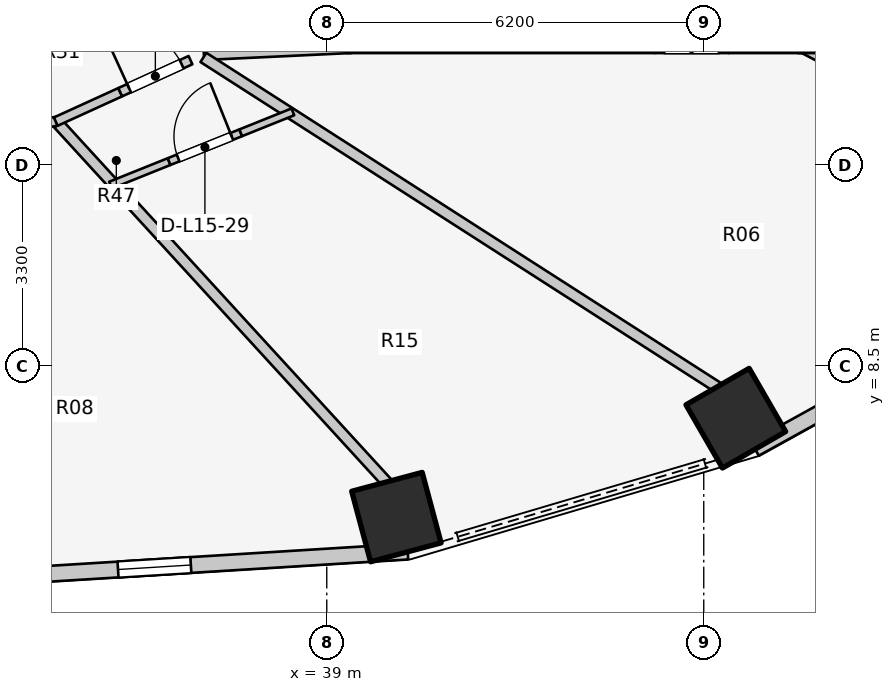
"""IFC4 building model, lengths in metres.
Left out: names, types, materials, properties, quantities, classifications, styles, units other than length and angle.
Written with IfcOpenShell. Run it as: python <this file> out.ifc"""

import sys

from ifc_helpers import new_model, si_unit, direction, frame, frame_2d, origin, origin_2d, place, context, subcontext, project, spatial, rectangle, extrude, element, fill, save


model = new_model("IFC4")
c1 = context("Model", 3, precision=1e-05, world=origin(), true_north=direction((0.0, 1.0)))
c2 = subcontext(c1, "Body", "Model", "MODEL_VIEW")
j1 = project(units=[si_unit("LENGTHUNIT", "METRE"), si_unit("PLANEANGLEUNIT", "RADIAN")], contexts=[c1])
p1 = place(None, origin())
s1 = spatial("IfcSite", under=j1, at=p1, CompositionType="ELEMENT")
p2 = place(p1, origin())
s2 = spatial("IfcBuilding", under=s1, at=p2, CompositionType="ELEMENT")
p3 = place(p2, frame((0.0, 0.0, 52.4)))
s3 = spatial("IfcBuildingStorey", under=s2, at=p3, CompositionType="ELEMENT", Elevation=52.4)
for number, where, z_axis, x_axis in (
    (1, (40.145, 6.014, 0.0), (0.0, 0.0, 1.0), (0.259, -0.966, 0.0)),
    (2, (45.727, 7.641, 0.0), (0.0, 0.0, 1.0), (0.5, -0.866, 0.0)),
):
    element("IfcColumn", number, at=place(p3, frame(where, z_axis=z_axis, x_axis=x_axis)), inside=s3, PredefinedType="COLUMN", context=c2, shape_type="SweptSolid", body=[
        extrude(rectangle(XDim=1.2, YDim=1.2, at=origin_2d()), origin(), (0.0, 0.0, 1.0), 3.1),
    ])
p4 = place(p3, frame((32.0, 4.931, 0.0), z_axis=(0.0, 0.0, 1.0), x_axis=(0.998090514779, 0.061768311519, 0.0)))
e3 = element("IfcWall", 3, at=p4, inside=s3, PredefinedType="STANDARD", context=c2, shape_type="SweptSolid", body=[
    extrude(rectangle(XDim=8.348, YDim=0.26, at=frame_2d((4.174, 0.0))), origin(), (0.0, 0.0, 1.0), 1.22),
])
p5 = place(p4, frame((3.574, 0.0, 0.15)))
e4 = element("IfcOpeningElement", 4, at=p5, cuts=e3, PredefinedType="OPENING", context=c2, shape_type="SweptSolid", body=[
    extrude(rectangle(XDim=1.2, YDim=0.9, at=frame_2d((0.6, 0.45))), frame((0.0, 0.14, 0.0), z_axis=(0.0, -1.0, 0.0), x_axis=(1.0, 0.0, 0.0)), (0.0, 0.0, 1.0), 0.28),
])
p6 = place(p3, frame((46.042, 7.138, 0.0), z_axis=(0.0, 0.0, 1.0), x_axis=(0.875137303239, 0.483874674352, 0.0)))
e5 = element("IfcWall", 5, at=p6, inside=s3, PredefinedType="STANDARD", context=c2, shape_type="SweptSolid", body=[
    extrude(rectangle(XDim=4.985, YDim=0.26, at=frame_2d((2.493, 0.0))), origin(), (0.0, 0.0, 1.0), 1.22),
])
p7 = place(p3, frame((46.756, 13.743, 0.0), z_axis=(0.0, 0.0, 1.0), x_axis=(0.885552742751, -0.464538846391, 0.0)))
e6 = element("IfcWall", 6, at=p7, inside=s3, PredefinedType="MOVABLE", context=c2, shape_type="SweptSolid", body=[
    extrude(rectangle(XDim=1.492, YDim=0.12, at=frame_2d((0.746, 0.0))), origin(), (0.0, 0.0, 1.0), 2.575),
])
p8 = place(p3, frame((36.98, 13.606, 0.0), z_axis=(0.0, 0.0, 1.0), x_axis=(0.998877427952, 0.047369651964, 0.0)))
e7 = element("IfcWall", 7, at=p8, inside=s3, PredefinedType="PARTITIONING", context=c2, shape_type="SweptSolid", body=[
    extrude(rectangle(XDim=2.433, YDim=0.15, at=frame_2d((1.216, 0.0))), origin(), (0.0, 0.0, 1.0), 1.22),
])
p9 = place(p3, frame((39.33, 13.72, 0.0), z_axis=(0.0, 0.0, 1.0), x_axis=(1.0, 0.0, 0.0)))
e8 = element("IfcWall", 8, at=p9, inside=s3, PredefinedType="PARTITIONING", context=c2, shape_type="SweptSolid", body=[
    extrude(rectangle(XDim=5.06, YDim=0.15, at=frame_2d((2.53, 0.0))), origin(), (0.0, 0.0, 1.0), 1.22),
])
p10 = place(p3, frame((44.39, 13.72, 0.0), z_axis=(0.0, 0.0, 1.0), x_axis=(1.0, 0.0, 0.0)))
e9 = element("IfcWall", 9, at=p10, inside=s3, PredefinedType="PARTITIONING", context=c2, shape_type="SweptSolid", body=[
    extrude(rectangle(XDim=1.22, YDim=0.15, at=frame_2d((0.61, 0.0))), origin(), (0.0, 0.0, 1.0), 2.575),
])
p11 = place(p10, frame((0.16, 0.0, 0.0)))
e10 = element("IfcOpeningElement", 10, at=p11, cuts=e9, PredefinedType="OPENING", context=c2, shape_type="SweptSolid", body=[
    extrude(rectangle(XDim=0.9, YDim=2.1, at=frame_2d((0.45, 1.05))), frame((0.0, 0.085, 0.0), z_axis=(0.0, -1.0, 0.0), x_axis=(1.0, 0.0, 0.0)), (0.0, 0.0, 1.0), 0.17),
])
p12 = place(p3, frame((45.61, 13.72, 0.0), z_axis=(0.0, 0.0, 1.0), x_axis=(1.0, 0.0, 0.0)))
e11 = element("IfcWall", 11, at=p12, inside=s3, PredefinedType="PARTITIONING", context=c2, shape_type="SweptSolid", body=[
    extrude(rectangle(XDim=1.24, YDim=0.15, at=frame_2d((0.62, 0.0))), origin(), (0.0, 0.0, 1.0), 2.575),
])
p13 = place(p3, frame((46.75, 13.72, 0.0), z_axis=(0.0, 0.0, 1.0), x_axis=(1.0, 0.0, 0.0)))
e12 = element("IfcWall", 12, at=p13, inside=s3, PredefinedType="PARTITIONING", context=c2, shape_type="SweptSolid", body=[
    extrude(rectangle(XDim=5.05, YDim=0.15, at=frame_2d((2.525, 0.0))), origin(), (0.0, 0.0, 1.0), 1.22),
])
p14 = place(p3, frame((34.586, 12.479, 0.0), z_axis=(0.0, 0.0, 1.0), x_axis=(0.675465011224, -0.737392038615, 0.0)))
e13 = element("IfcWall", 13, at=p14, inside=s3, PredefinedType="PARTITIONING", context=c2, shape_type="SweptSolid", body=[
    extrude(rectangle(XDim=8.007, YDim=0.18, at=frame_2d((4.003, 0.0))), origin(), (0.0, 0.0, 1.0), 1.22),
])
p15 = place(p3, frame((36.971, 13.574, 0.0), z_axis=(0.0, 0.0, 1.0), x_axis=(0.841689919529, -0.5399611832, 0.0)))
e14 = element("IfcWall", 14, at=p15, inside=s3, PredefinedType="PARTITIONING", context=c2, shape_type="SweptSolid", body=[
    extrude(rectangle(XDim=10.058, YDim=0.18, at=frame_2d((5.029, 0.0))), origin(), (0.0, 0.0, 1.0), 1.22),
])
p16 = place(p3, frame((33.903, 12.427, 0.0), z_axis=(0.0, 0.0, 1.0), x_axis=(0.989636221287, 0.143597177958, 0.0)))
e15 = element("IfcWall", 15, at=p16, inside=s3, PredefinedType="PARTITIONING", context=c2, shape_type="SweptSolid", body=[
    extrude(rectangle(XDim=0.66, YDim=0.15, at=frame_2d((0.33, 0.0))), origin(), (0.0, 0.0, 1.0), 2.575),
])
p17 = place(p3, frame((35.444, 11.474, 0.0), z_axis=(0.0, 0.0, 1.0), x_axis=(0.927842429586, 0.372972419704, 0.0)))
e16 = element("IfcWall", 16, at=p17, inside=s3, PredefinedType="MOVABLE", context=c2, shape_type="SweptSolid", body=[
    extrude(rectangle(XDim=1.038, YDim=0.12, at=frame_2d((0.519, 0.0))), origin(), (0.0, 0.0, 1.0), 1.22),
])
p18 = place(p3, frame((36.407, 11.861, 0.0), z_axis=(0.0, 0.0, 1.0), x_axis=(0.927932127314, 0.372749201339, 0.0)))
e17 = element("IfcWall", 17, at=p18, inside=s3, PredefinedType="MOVABLE", context=c2, shape_type="SweptSolid", body=[
    extrude(rectangle(XDim=1.27, YDim=0.12, at=frame_2d((0.635, 0.0))), origin(), (0.0, 0.0, 1.0), 2.16),
])
p19 = place(p18, frame((0.16, 0.0, 0.0)))
e18 = element("IfcOpeningElement", 18, at=p19, cuts=e17, PredefinedType="OPENING", context=c2, shape_type="SweptSolid", body=[
    extrude(rectangle(XDim=0.95, YDim=2.1, at=frame_2d((0.475, 1.05))), frame((0.0, 0.07, 0.0), z_axis=(0.0, -1.0, 0.0), x_axis=(1.0, 0.0, 0.0)), (0.0, 0.0, 1.0), 0.14),
])
p20 = place(p3, frame((37.585, 12.334, 0.0), z_axis=(0.0, 0.0, 1.0), x_axis=(0.927874016973, 0.372893830233, 0.0)))
e19 = element("IfcWall", 19, at=p20, inside=s3, PredefinedType="MOVABLE", context=c2, shape_type="SweptSolid", body=[
    extrude(rectangle(XDim=0.924, YDim=0.12, at=frame_2d((0.462, 0.0))), origin(), (0.0, 0.0, 1.0), 2.575),
])
p21 = place(p3, frame((34.543, 12.518, 0.0), z_axis=(0.0, 0.0, 1.0), x_axis=(0.909741327194, 0.415175526249, 0.0)))
e20 = element("IfcWall", 20, at=p21, inside=s3, PredefinedType="PARTITIONING", context=c2, shape_type="SweptSolid", body=[
    extrude(rectangle(XDim=1.166, YDim=0.15, at=frame_2d((0.583, 0.0))), origin(), (0.0, 0.0, 1.0), 1.22),
])
p22 = place(p3, frame((35.603, 13.001, 0.0), z_axis=(0.0, 0.0, 1.0), x_axis=(0.909740090182, 0.415178236804, 0.0)))
e21 = element("IfcWall", 21, at=p22, inside=s3, PredefinedType="PARTITIONING", context=c2, shape_type="SweptSolid", body=[
    extrude(rectangle(XDim=1.27, YDim=0.15, at=frame_2d((0.635, 0.0))), origin(), (0.0, 0.0, 1.0), 2.16),
])
p23 = place(p22, frame((0.16, 0.0, 0.0)))
e22 = element("IfcOpeningElement", 22, at=p23, cuts=e21, PredefinedType="OPENING", context=c2, shape_type="SweptSolid", body=[
    extrude(rectangle(XDim=0.95, YDim=2.1, at=frame_2d((0.475, 1.05))), frame((0.0, 0.085, 0.0), z_axis=(0.0, -1.0, 0.0), x_axis=(1.0, 0.0, 0.0)), (0.0, 0.0, 1.0), 0.17),
])
p24 = place(p5, origin())
e23 = element("IfcWindow", 23, at=p24, inside=s3, PartitioningType="SINGLE_PANEL", PredefinedType="WINDOW", context=c2, shape_type="SweptSolid", body=[
    extrude(rectangle(XDim=1.2, YDim=0.9, at=frame_2d((0.6, 0.45))), frame((0.0, 0.03, 0.0), z_axis=(0.0, -1.0, 0.0), x_axis=(1.0, 0.0, 0.0)), (0.0, 0.0, 1.0), 0.06),
])
fill(e4, e23)
p25 = place(p19, origin())
e24 = element("IfcDoor", 24, at=p25, inside=s3, OperationType="SINGLE_SWING_RIGHT", PredefinedType="DOOR", context=c2, shape_type="SweptSolid", body=[
    extrude(rectangle(XDim=0.95, YDim=2.1, at=frame_2d((0.475, 1.05))), frame((0.0, 0.025, 0.0), z_axis=(0.0, -1.0, 0.0), x_axis=(1.0, 0.0, 0.0)), (0.0, 0.0, 1.0), 0.05),
])
fill(e18, e24)
p26 = place(p23, origin())
e25 = element("IfcDoor", 25, at=p26, inside=s3, OperationType="SINGLE_SWING_LEFT", PredefinedType="DOOR", context=c2, shape_type="SweptSolid", body=[
    extrude(rectangle(XDim=0.95, YDim=2.1, at=frame_2d((0.475, 1.05))), frame((0.0, 0.025, 0.0), z_axis=(0.0, -1.0, 0.0), x_axis=(1.0, 0.0, 0.0)), (0.0, 0.0, 1.0), 0.05),
])
fill(e22, e25)
save(model, sys.argv[1])
